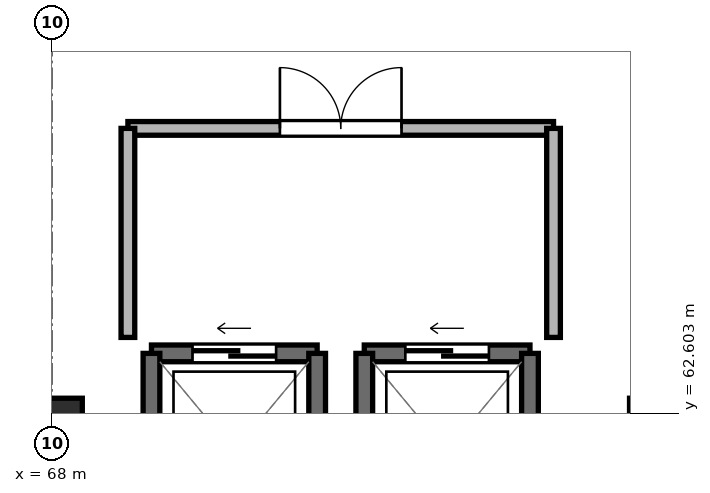
"""IFC4 building model, lengths in metres.
Left out: names, types, materials, properties, quantities, classifications, styles, units other than length and angle.
Written with IfcOpenShell. Run it as: python <this file> out.ifc"""

import sys

from ifc_helpers import new_model, si_unit, direction, frame, frame_2d, origin, origin_2d, place, context, subcontext, project, spatial, rectangle, extrude, element, fill, save


model = new_model("IFC4")
c1 = context("Model", 3, precision=1e-05, world=origin(), true_north=direction((0.0, 1.0)))
c2 = subcontext(c1, "Body", "Model", "MODEL_VIEW")
j1 = project(units=[si_unit("LENGTHUNIT", "METRE"), si_unit("PLANEANGLEUNIT", "RADIAN")], contexts=[c1])
p1 = place(None, origin())
s1 = spatial("IfcSite", under=j1, at=p1, CompositionType="ELEMENT")
p2 = place(p1, origin())
s2 = spatial("IfcBuilding", under=s1, at=p2, CompositionType="ELEMENT")
p3 = place(p2, frame((0.0, 0.0, 40.55)))
s3 = spatial("IfcBuildingStorey", under=s2, at=p3, CompositionType="ELEMENT", Elevation=40.55)
for number, where, z_axis, x_axis in (
    (1, (68.0, 62.4, -0.24), (0.0, 0.0, 1.0), (1.0, 0.0, 0.0)),
    (2, (76.0, 62.4, -0.24), (0.0, 0.0, 1.0), (1.0, 0.0, 0.0)),
):
    element("IfcColumn", number, at=place(p3, frame(where, z_axis=z_axis, x_axis=x_axis)), inside=s3, PredefinedType="COLUMN", context=c2, shape_type="SweptSolid", body=[
        extrude(rectangle(XDim=0.8, YDim=0.8, at=origin_2d()), origin(), (0.0, 0.0, 1.0), 3.25),
    ])
p4 = place(p3, frame((71.49, 63.39, 0.0), z_axis=(0.0, 0.0, 1.0), x_axis=(-1.0, 0.0, 0.0)))
e3 = element("IfcWall", 3, at=p4, inside=s3, PredefinedType="SHEAR", context=c2, shape_type="SweptSolid", body=[
    extrude(rectangle(XDim=2.18, YDim=0.22, at=frame_2d((1.09, 0.0))), origin(), (0.0, 0.0, 1.0), 3.01),
])
p5 = place(p4, frame((0.54, 0.0, 0.0)))
e4 = element("IfcOpeningElement", 4, at=p5, cuts=e3, PredefinedType="OPENING", context=c2, shape_type="SweptSolid", body=[
    extrude(rectangle(XDim=1.1, YDim=2.2, at=frame_2d((0.55, 1.1))), frame((0.0, 0.122, 0.0), z_axis=(0.0, -1.0, 0.0), x_axis=(1.0, 0.0, 0.0)), (0.0, 0.0, 1.0), 0.244),
])
for number, where, z_axis, x_axis in (
    (5, (69.31, 63.39, 0.0), (0.0, 0.0, 1.0), (0.0, -1.0, 0.0)),
    (6, (71.49, 60.81, 0.0), (0.0, 0.0, 1.0), (0.0, 1.0, 0.0)),
):
    element("IfcWall", number, at=place(p3, frame(where, z_axis=z_axis, x_axis=x_axis)), inside=s3, PredefinedType="SHEAR", context=c2, shape_type="SweptSolid", body=[
        extrude(rectangle(XDim=2.58, YDim=0.22, at=frame_2d((1.29, 0.0))), origin(), (0.0, 0.0, 1.0), 3.01),
    ])
p6 = place(p3, frame((74.29, 63.39, 0.0), z_axis=(0.0, 0.0, 1.0), x_axis=(-1.0, 0.0, 0.0)))
e7 = element("IfcWall", 7, at=p6, inside=s3, PredefinedType="SHEAR", context=c2, shape_type="SweptSolid", body=[
    extrude(rectangle(XDim=2.18, YDim=0.22, at=frame_2d((1.09, 0.0))), origin(), (0.0, 0.0, 1.0), 3.01),
])
p7 = place(p6, frame((0.54, 0.0, 0.0)))
e8 = element("IfcOpeningElement", 8, at=p7, cuts=e7, PredefinedType="OPENING", context=c2, shape_type="SweptSolid", body=[
    extrude(rectangle(XDim=1.1, YDim=2.2, at=frame_2d((0.55, 1.1))), frame((0.0, 0.122, 0.0), z_axis=(0.0, -1.0, 0.0), x_axis=(1.0, 0.0, 0.0)), (0.0, 0.0, 1.0), 0.244),
])
for number, where, z_axis, x_axis in (
    (9, (72.11, 63.39, 0.0), (0.0, 0.0, 1.0), (0.0, -1.0, 0.0)),
    (10, (74.29, 60.81, 0.0), (0.0, 0.0, 1.0), (0.0, 1.0, 0.0)),
):
    element("IfcWall", number, at=place(p3, frame(where, z_axis=z_axis, x_axis=x_axis)), inside=s3, PredefinedType="SHEAR", context=c2, shape_type="SweptSolid", body=[
        extrude(rectangle(XDim=2.58, YDim=0.22, at=frame_2d((1.29, 0.0))), origin(), (0.0, 0.0, 1.0), 3.01),
    ])
p8 = place(p3, frame((69.0, 66.35, 0.0), z_axis=(0.0, 0.0, 1.0), x_axis=(1.0, 0.0, 0.0)))
e11 = element("IfcWall", 11, at=p8, inside=s3, PredefinedType="PARTITIONING", context=c2, shape_type="SweptSolid", body=[
    extrude(rectangle(XDim=5.6, YDim=0.18, at=frame_2d((2.8, 0.0))), origin(), (0.0, 0.0, 1.0), 2.53),
])
p9 = place(p8, frame((2.0, 0.0, 0.0)))
e12 = element("IfcOpeningElement", 12, at=p9, cuts=e11, PredefinedType="OPENING", context=c2, shape_type="SweptSolid", body=[
    extrude(rectangle(XDim=1.6, YDim=2.2, at=frame_2d((0.8, 1.1))), frame((0.0, 0.102, 0.0), z_axis=(0.0, -1.0, 0.0), x_axis=(1.0, 0.0, 0.0)), (0.0, 0.0, 1.0), 0.204),
])
for number, where, z_axis, x_axis in (
    (13, (69.0, 63.6, 0.0), (0.0, 0.0, 1.0), (0.0, 1.0, 0.0)),
    (14, (74.6, 63.6, 0.0), (0.0, 0.0, 1.0), (0.0, 1.0, 0.0)),
):
    element("IfcWall", number, at=place(p3, frame(where, z_axis=z_axis, x_axis=x_axis)), inside=s3, PredefinedType="PARTITIONING", context=c2, shape_type="SweptSolid", body=[
        extrude(rectangle(XDim=2.75, YDim=0.18, at=frame_2d((1.375, 0.0))), origin(), (0.0, 0.0, 1.0), 2.53),
    ])
p10 = place(p5, origin())
e15 = element("IfcDoor", 15, at=p10, inside=s3, OperationType="SLIDING_TO_RIGHT", PredefinedType="DOOR", context=c2, shape_type="SweptSolid", body=[
    extrude(rectangle(XDim=1.1, YDim=2.2, at=frame_2d((0.55, 1.1))), frame((0.0, 0.025, 0.0), z_axis=(0.0, -1.0, 0.0), x_axis=(1.0, 0.0, 0.0)), (0.0, 0.0, 1.0), 0.05),
])
fill(e4, e15)
p11 = place(p7, origin())
e16 = element("IfcDoor", 16, at=p11, inside=s3, OperationType="SLIDING_TO_RIGHT", PredefinedType="DOOR", context=c2, shape_type="SweptSolid", body=[
    extrude(rectangle(XDim=1.1, YDim=2.2, at=frame_2d((0.55, 1.1))), frame((0.0, 0.025, 0.0), z_axis=(0.0, -1.0, 0.0), x_axis=(1.0, 0.0, 0.0)), (0.0, 0.0, 1.0), 0.05),
])
fill(e8, e16)
p12 = place(p9, origin())
e17 = element("IfcDoor", 17, at=p12, inside=s3, OperationType="DOUBLE_DOOR_SINGLE_SWING", PredefinedType="DOOR", context=c2, shape_type="SweptSolid", body=[
    extrude(rectangle(XDim=1.6, YDim=2.2, at=frame_2d((0.8, 1.1))), frame((0.0, 0.025, 0.0), z_axis=(0.0, -1.0, 0.0), x_axis=(1.0, 0.0, 0.0)), (0.0, 0.0, 1.0), 0.05),
])
fill(e12, e17)
save(model, sys.argv[1])
